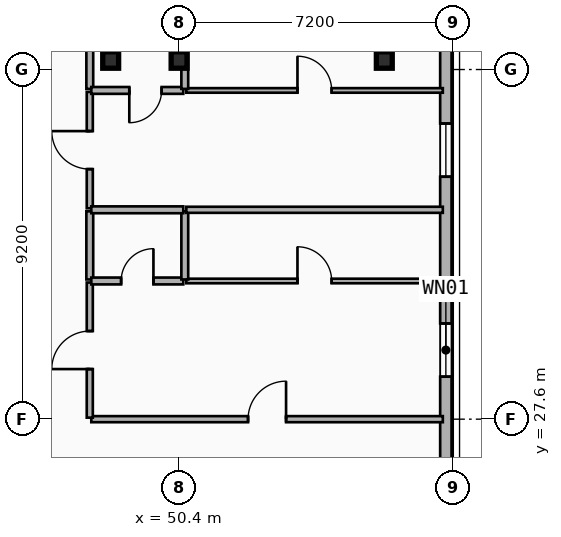
"""IFC4 building model, lengths in metres.
Left out: names, types, materials, properties, quantities, classifications, styles, units other than length and angle.
Written with IfcOpenShell. Run it as: python <this file> out.ifc"""

import sys

from ifc_helpers import new_model, si_unit, direction, frame, frame_2d, origin, origin_2d, place, context, subcontext, project, spatial, rectangle, i_section, extrude, element, fill, save


model = new_model("IFC4")
c1 = context("Model", 3, precision=1e-05, world=origin(), true_north=direction((0.0, 1.0)))
c2 = subcontext(c1, "Body", "Model", "MODEL_VIEW")
j1 = project(units=[si_unit("LENGTHUNIT", "METRE"), si_unit("PLANEANGLEUNIT", "RADIAN")], contexts=[c1])
p1 = place(None, origin())
s1 = spatial("IfcSite", under=j1, at=p1, CompositionType="ELEMENT")
p2 = place(p1, origin())
s2 = spatial("IfcBuilding", under=s1, at=p2, CompositionType="ELEMENT")
p3 = place(p2, frame((0.0, 0.0, 94.3)))
s3 = spatial("IfcBuildingStorey", under=s2, at=p3, CompositionType="ELEMENT", Elevation=94.3)
for number, where, z_axis, x_axis in (
    (1, (48.6, 37.05, 0.0), (0.0, 0.0, 1.0), (1.0, 0.0, 0.0)),
    (2, (50.4, 37.05, 0.0), (0.0, 0.0, 1.0), (1.0, 0.0, 0.0)),
    (3, (55.8, 37.05, 0.0), (0.0, 0.0, 1.0), (1.0, 0.0, 0.0)),
):
    element("IfcColumn", number, at=place(p3, frame(where, z_axis=z_axis, x_axis=x_axis)), inside=s3, PredefinedType="COLUMN", context=c2, shape_type="SweptSolid", body=[
        extrude(i_section(OverallWidth=0.418, OverallDepth=0.432, WebThickness=0.035, FlangeThickness=0.056, FilletRadius=0.015, at=origin_2d()), origin(), (0.0, 0.0, 1.0), 3.5),
    ])
p4 = place(p3, frame((57.42, 39.0, 0.0), z_axis=(0.0, 0.0, 1.0), x_axis=(0.0, -1.0, 0.0)))
e4 = element("IfcWall", 4, at=p4, inside=s3, PredefinedType="SOLIDWALL", context=c2, shape_type="SweptSolid", body=[
    extrude(rectangle(XDim=18.0, YDim=0.3, at=frame_2d((9.0, 0.0))), origin(), (0.0, 0.0, 1.0), 3.24),
])
p5 = place(p4, frame((8.882, 0.0, 0.48)))
e5 = element("IfcOpeningElement", 5, at=p5, cuts=e4, PredefinedType="OPENING", context=c2, shape_type="SweptSolid", body=[
    extrude(rectangle(XDim=1.4, YDim=1.8, at=frame_2d((0.7, 0.9))), frame((0.0, 0.16, 0.0), z_axis=(0.0, -1.0, 0.0), x_axis=(1.0, 0.0, 0.0)), (0.0, 0.0, 1.0), 0.32),
])
p6 = place(p4, frame((3.621, 0.0, 0.48)))
e6 = element("IfcOpeningElement", 6, at=p6, cuts=e4, PredefinedType="OPENING", context=c2, shape_type="SweptSolid", body=[
    extrude(rectangle(XDim=1.4, YDim=1.8, at=frame_2d((0.7, 0.9))), frame((0.0, 0.16, 0.0), z_axis=(0.0, -1.0, 0.0), x_axis=(1.0, 0.0, 0.0)), (0.0, 0.0, 1.0), 0.32),
])
p7 = place(p4, frame((16.28, 0.0, 0.65)))
e7 = element("IfcOpeningElement", 7, at=p7, cuts=e4, PredefinedType="OPENING", context=c2, shape_type="SweptSolid", body=[
    extrude(rectangle(XDim=1.4, YDim=1.8, at=frame_2d((0.7, 0.9))), frame((0.0, 0.16, 0.0), z_axis=(0.0, -1.0, 0.0), x_axis=(1.0, 0.0, 0.0)), (0.0, 0.0, 1.0), 0.32),
])
p8 = place(p3, frame((48.09, 27.6, 0.0), z_axis=(0.0, 0.0, 1.0), x_axis=(1.0, 0.0, 0.0)))
e8 = element("IfcWall", 8, at=p8, inside=s3, PredefinedType="PARTITIONING", context=c2, shape_type="SweptSolid", body=[
    extrude(rectangle(XDim=9.25, YDim=0.16, at=frame_2d((4.625, 0.0))), origin(), (0.0, 0.0, 1.0), 2.57),
])
p9 = place(p8, frame((4.125, 0.0, 0.0)))
e9 = element("IfcOpeningElement", 9, at=p9, cuts=e8, PredefinedType="OPENING", context=c2, shape_type="SweptSolid", body=[
    extrude(rectangle(XDim=1.0, YDim=2.15, at=frame_2d((0.5, 1.075))), frame((0.0, 0.09, 0.0), z_axis=(0.0, -1.0, 0.0), x_axis=(1.0, 0.0, 0.0)), (0.0, 0.0, 1.0), 0.18),
])
p10 = place(p3, frame((48.05, 27.64, 0.0), z_axis=(0.0, 0.0, 1.0), x_axis=(0.0, 1.0, 0.0)))
e10 = element("IfcWall", 10, at=p10, inside=s3, PredefinedType="PARTITIONING", context=c2, shape_type="SweptSolid", body=[
    extrude(rectangle(XDim=3.556, YDim=0.16, at=frame_2d((1.778, 0.0))), origin(), (0.0, 0.0, 1.0), 3.24),
])
p11 = place(p10, frame((1.278, 0.0, 0.0)))
e11 = element("IfcOpeningElement", 11, at=p11, cuts=e10, PredefinedType="OPENING", context=c2, shape_type="SweptSolid", body=[
    extrude(rectangle(XDim=1.0, YDim=2.15, at=frame_2d((0.5, 1.075))), frame((0.0, 0.09, 0.0), z_axis=(0.0, -1.0, 0.0), x_axis=(1.0, 0.0, 0.0)), (0.0, 0.0, 1.0), 0.18),
])
p12 = place(p3, frame((48.05, 31.276, 0.0), z_axis=(0.0, 0.0, 1.0), x_axis=(0.0, 1.0, 0.0)))
e12 = element("IfcWall", 12, at=p12, inside=s3, PredefinedType="PLUMBINGWALL", context=c2, shape_type="SweptSolid", body=[
    extrude(rectangle(XDim=1.793, YDim=0.18, at=frame_2d((0.896, 0.0))), origin(), (0.0, 0.0, 1.0), 3.24),
])
p13 = place(p3, frame((48.05, 33.149, 0.0), z_axis=(0.0, 0.0, 1.0), x_axis=(0.0, 1.0, 0.0)))
e13 = element("IfcWall", 13, at=p13, inside=s3, PredefinedType="PARTITIONING", context=c2, shape_type="SweptSolid", body=[
    extrude(rectangle(XDim=3.061, YDim=0.16, at=frame_2d((1.531, 0.0))), origin(), (0.0, 0.0, 1.0), 3.24),
])
p14 = place(p13, frame((1.031, 0.0, 0.0)))
e14 = element("IfcOpeningElement", 14, at=p14, cuts=e13, PredefinedType="OPENING", context=c2, shape_type="SweptSolid", body=[
    extrude(rectangle(XDim=1.0, YDim=2.15, at=frame_2d((0.5, 1.075))), frame((0.0, 0.09, 0.0), z_axis=(0.0, -1.0, 0.0), x_axis=(1.0, 0.0, 0.0)), (0.0, 0.0, 1.0), 0.18),
])
p15 = place(p3, frame((48.05, 36.29, 0.0), z_axis=(0.0, 0.0, 1.0), x_axis=(0.0, 1.0, 0.0)))
e15 = element("IfcWall", 15, at=p15, inside=s3, PredefinedType="PLUMBINGWALL", context=c2, shape_type="SweptSolid", body=[
    extrude(rectangle(XDim=1.57, YDim=0.18, at=frame_2d((0.785, 0.0))), origin(), (0.0, 0.0, 1.0), 2.72),
])
p16 = place(p3, frame((48.09, 31.236, 0.0), z_axis=(0.0, 0.0, 1.0), x_axis=(1.0, 0.0, 0.0)))
e16 = element("IfcWall", 16, at=p16, inside=s3, PredefinedType="PLUMBINGWALL", context=c2, shape_type="SweptSolid", body=[
    extrude(rectangle(XDim=2.42, YDim=0.18, at=frame_2d((1.21, 0.0))), origin(), (0.0, 0.0, 1.0), 2.57),
])
p17 = place(p16, frame((0.785, 0.0, 0.0)))
e17 = element("IfcOpeningElement", 17, at=p17, cuts=e16, PredefinedType="OPENING", context=c2, shape_type="SweptSolid", body=[
    extrude(rectangle(XDim=0.85, YDim=2.1, at=frame_2d((0.425, 1.05))), frame((0.0, 0.1, 0.0), z_axis=(0.0, -1.0, 0.0), x_axis=(1.0, 0.0, 0.0)), (0.0, 0.0, 1.0), 0.2),
])
p18 = place(p3, frame((50.59, 31.236, 0.0), z_axis=(0.0, 0.0, 1.0), x_axis=(1.0, 0.0, 0.0)))
e18 = element("IfcWall", 18, at=p18, inside=s3, PredefinedType="PARTITIONING", context=c2, shape_type="SweptSolid", body=[
    extrude(rectangle(XDim=6.75, YDim=0.12, at=frame_2d((3.375, 0.0))), origin(), (0.0, 0.0, 1.0), 2.57),
])
p19 = place(p18, frame((2.925, 0.0, 0.0)))
e19 = element("IfcOpeningElement", 19, at=p19, cuts=e18, PredefinedType="OPENING", context=c2, shape_type="SweptSolid", body=[
    extrude(rectangle(XDim=0.9, YDim=2.1, at=frame_2d((0.45, 1.05))), frame((0.0, 0.07, 0.0), z_axis=(0.0, -1.0, 0.0), x_axis=(1.0, 0.0, 0.0)), (0.0, 0.0, 1.0), 0.14),
])
p20 = place(p3, frame((50.55, 31.276, 0.0), z_axis=(0.0, 0.0, 1.0), x_axis=(0.0, 1.0, 0.0)))
e20 = element("IfcWall", 20, at=p20, inside=s3, PredefinedType="PLUMBINGWALL", context=c2, shape_type="SweptSolid", body=[
    extrude(rectangle(XDim=1.793, YDim=0.18, at=frame_2d((0.896, 0.0))), origin(), (0.0, 0.0, 1.0), 2.57),
])
p21 = place(p3, frame((48.09, 33.109, 0.0), z_axis=(0.0, 0.0, 1.0), x_axis=(1.0, 0.0, 0.0)))
e21 = element("IfcWall", 21, at=p21, inside=s3, PredefinedType="PLUMBINGWALL", context=c2, shape_type="SweptSolid", body=[
    extrude(rectangle(XDim=2.42, YDim=0.18, at=frame_2d((1.21, 0.0))), origin(), (0.0, 0.0, 1.0), 2.57),
])
p22 = place(p3, frame((50.59, 33.109, 0.0), z_axis=(0.0, 0.0, 1.0), x_axis=(1.0, 0.0, 0.0)))
e22 = element("IfcWall", 22, at=p22, inside=s3, PredefinedType="PARTITIONING", context=c2, shape_type="SweptSolid", body=[
    extrude(rectangle(XDim=6.75, YDim=0.16, at=frame_2d((3.375, 0.0))), origin(), (0.0, 0.0, 1.0), 2.57),
])
p23 = place(p3, frame((50.51, 36.25, 0.0), z_axis=(0.0, 0.0, 1.0), x_axis=(-1.0, 0.0, 0.0)))
e23 = element("IfcWall", 23, at=p23, inside=s3, PredefinedType="PLUMBINGWALL", context=c2, shape_type="SweptSolid", body=[
    extrude(rectangle(XDim=2.42, YDim=0.18, at=frame_2d((1.21, 0.0))), origin(), (0.0, 0.0, 1.0), 2.57),
])
p24 = place(p23, frame((0.57, 0.0, 0.0)))
e24 = element("IfcOpeningElement", 24, at=p24, cuts=e23, PredefinedType="OPENING", context=c2, shape_type="SweptSolid", body=[
    extrude(rectangle(XDim=0.85, YDim=2.1, at=frame_2d((0.425, 1.05))), frame((0.0, 0.1, 0.0), z_axis=(0.0, -1.0, 0.0), x_axis=(1.0, 0.0, 0.0)), (0.0, 0.0, 1.0), 0.2),
])
p25 = place(p3, frame((50.59, 36.25, 0.0), z_axis=(0.0, 0.0, 1.0), x_axis=(1.0, 0.0, 0.0)))
e25 = element("IfcWall", 25, at=p25, inside=s3, PredefinedType="PARTITIONING", context=c2, shape_type="SweptSolid", body=[
    extrude(rectangle(XDim=6.75, YDim=0.12, at=frame_2d((3.375, 0.0))), origin(), (0.0, 0.0, 1.0), 2.57),
])
p26 = place(p25, frame((2.925, 0.0, 0.0)))
e26 = element("IfcOpeningElement", 26, at=p26, cuts=e25, PredefinedType="OPENING", context=c2, shape_type="SweptSolid", body=[
    extrude(rectangle(XDim=0.9, YDim=2.1, at=frame_2d((0.45, 1.05))), frame((0.0, 0.07, 0.0), z_axis=(0.0, -1.0, 0.0), x_axis=(1.0, 0.0, 0.0)), (0.0, 0.0, 1.0), 0.14),
])
p27 = place(p3, frame((50.55, 36.29, 0.0), z_axis=(0.0, 0.0, 1.0), x_axis=(0.0, 1.0, 0.0)))
e27 = element("IfcWall", 27, at=p27, inside=s3, PredefinedType="PLUMBINGWALL", context=c2, shape_type="SweptSolid", body=[
    extrude(rectangle(XDim=1.57, YDim=0.18, at=frame_2d((0.785, 0.0))), origin(), (0.0, 0.0, 1.0), 2.57),
])
p28 = place(p5, origin())
e28 = element("IfcWindow", 28, at=p28, inside=s3, PartitioningType="SINGLE_PANEL", PredefinedType="WINDOW", context=c2, shape_type="SweptSolid", body=[
    extrude(rectangle(XDim=1.4, YDim=1.8, at=frame_2d((0.7, 0.9))), frame((0.0, 0.03, 0.0), z_axis=(0.0, -1.0, 0.0), x_axis=(1.0, 0.0, 0.0)), (0.0, 0.0, 1.0), 0.06),
])
fill(e5, e28)
p29 = place(p6, origin())
e29 = element("IfcWindow", 29, at=p29, inside=s3, PartitioningType="SINGLE_PANEL", PredefinedType="WINDOW", context=c2, shape_type="SweptSolid", body=[
    extrude(rectangle(XDim=1.4, YDim=1.8, at=frame_2d((0.7, 0.9))), frame((0.0, 0.03, 0.0), z_axis=(0.0, -1.0, 0.0), x_axis=(1.0, 0.0, 0.0)), (0.0, 0.0, 1.0), 0.06),
])
fill(e6, e29)
p30 = place(p9, origin())
e30 = element("IfcDoor", 30, at=p30, inside=s3, OperationType="SINGLE_SWING_RIGHT", PredefinedType="DOOR", context=c2, shape_type="SweptSolid", body=[
    extrude(rectangle(XDim=1.0, YDim=2.15, at=frame_2d((0.5, 1.075))), frame((0.0, 0.025, 0.0), z_axis=(0.0, -1.0, 0.0), x_axis=(1.0, 0.0, 0.0)), (0.0, 0.0, 1.0), 0.05),
])
fill(e9, e30)
p31 = place(p11, origin())
e31 = element("IfcDoor", 31, at=p31, inside=s3, OperationType="SINGLE_SWING_LEFT", PredefinedType="DOOR", context=c2, shape_type="SweptSolid", body=[
    extrude(rectangle(XDim=1.0, YDim=2.15, at=frame_2d((0.5, 1.075))), frame((0.0, 0.025, 0.0), z_axis=(0.0, -1.0, 0.0), x_axis=(1.0, 0.0, 0.0)), (0.0, 0.0, 1.0), 0.05),
])
fill(e11, e31)
p32 = place(p14, origin())
e32 = element("IfcDoor", 32, at=p32, inside=s3, OperationType="SINGLE_SWING_RIGHT", PredefinedType="DOOR", context=c2, shape_type="SweptSolid", body=[
    extrude(rectangle(XDim=1.0, YDim=2.15, at=frame_2d((0.5, 1.075))), frame((0.0, 0.025, 0.0), z_axis=(0.0, -1.0, 0.0), x_axis=(1.0, 0.0, 0.0)), (0.0, 0.0, 1.0), 0.05),
])
fill(e14, e32)
p33 = place(p17, origin())
e33 = element("IfcDoor", 33, at=p33, inside=s3, OperationType="SINGLE_SWING_RIGHT", PredefinedType="DOOR", context=c2, shape_type="SweptSolid", body=[
    extrude(rectangle(XDim=0.85, YDim=2.1, at=frame_2d((0.425, 1.05))), frame((0.0, 0.025, 0.0), z_axis=(0.0, -1.0, 0.0), x_axis=(1.0, 0.0, 0.0)), (0.0, 0.0, 1.0), 0.05),
])
fill(e17, e33)
p34 = place(p19, origin())
e34 = element("IfcDoor", 34, at=p34, inside=s3, OperationType="SINGLE_SWING_LEFT", PredefinedType="DOOR", context=c2, shape_type="SweptSolid", body=[
    extrude(rectangle(XDim=0.9, YDim=2.1, at=frame_2d((0.45, 1.05))), frame((0.0, 0.025, 0.0), z_axis=(0.0, -1.0, 0.0), x_axis=(1.0, 0.0, 0.0)), (0.0, 0.0, 1.0), 0.05),
])
fill(e19, e34)
p35 = place(p24, origin())
e35 = element("IfcDoor", 35, at=p35, inside=s3, OperationType="SINGLE_SWING_RIGHT", PredefinedType="DOOR", context=c2, shape_type="SweptSolid", body=[
    extrude(rectangle(XDim=0.85, YDim=2.1, at=frame_2d((0.425, 1.05))), frame((0.0, 0.025, 0.0), z_axis=(0.0, -1.0, 0.0), x_axis=(1.0, 0.0, 0.0)), (0.0, 0.0, 1.0), 0.05),
])
fill(e24, e35)
p36 = place(p26, origin())
e36 = element("IfcDoor", 36, at=p36, inside=s3, OperationType="SINGLE_SWING_LEFT", PredefinedType="DOOR", context=c2, shape_type="SweptSolid", body=[
    extrude(rectangle(XDim=0.9, YDim=2.1, at=frame_2d((0.45, 1.05))), frame((0.0, 0.025, 0.0), z_axis=(0.0, -1.0, 0.0), x_axis=(1.0, 0.0, 0.0)), (0.0, 0.0, 1.0), 0.05),
])
fill(e26, e36)
save(model, sys.argv[1])
